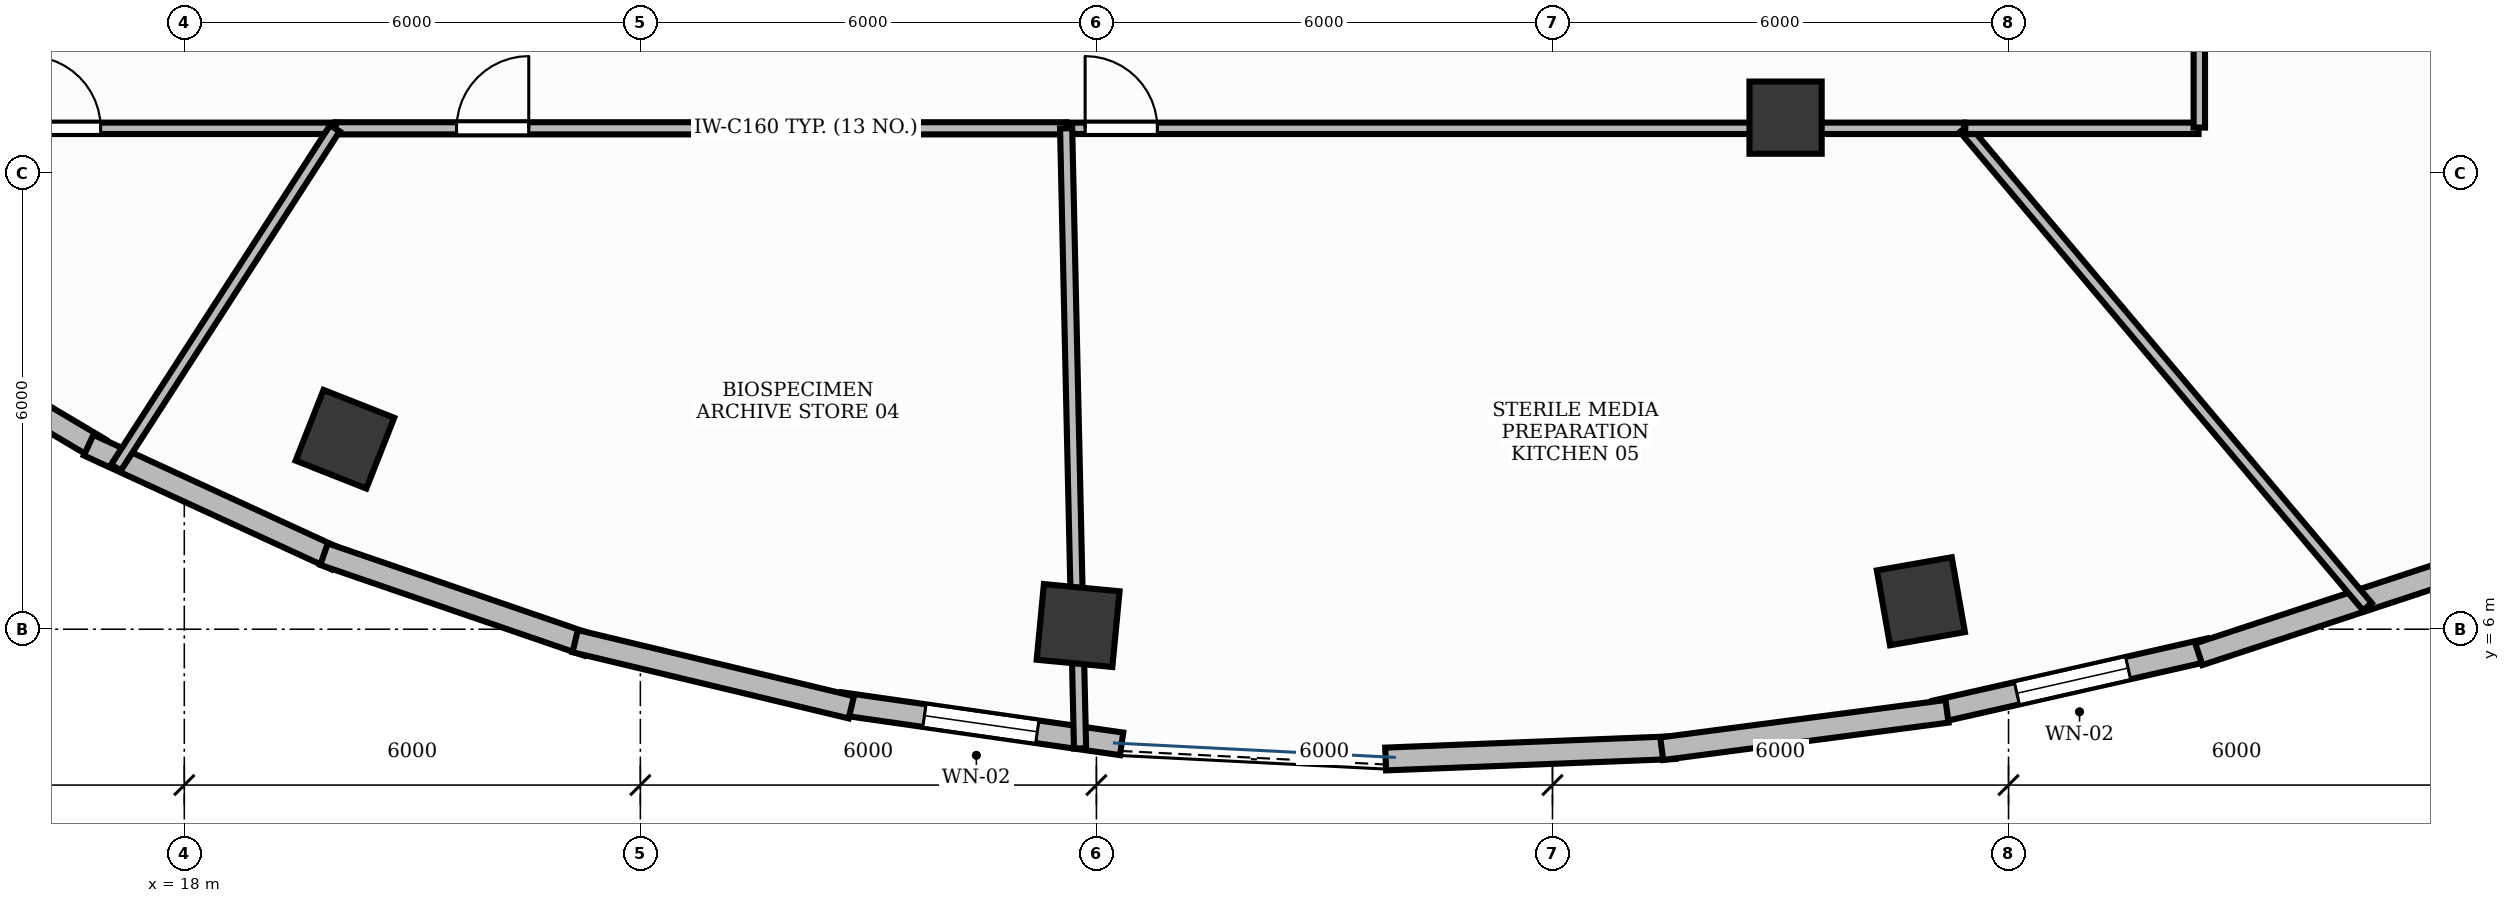
"""IFC4 building model, lengths in metres.
Left out: names, types, materials, properties, quantities, classifications, styles, units other than length and angle.
Written with IfcOpenShell. Run it as: python <this file> out.ifc"""

import sys

from ifc_helpers import new_model, si_unit, direction, frame, frame_2d, origin, origin_2d, place, context, subcontext, project, spatial, rectangle, extrude, element, fill, save


model = new_model("IFC4")
c1 = context("Model", 3, precision=1e-05, world=origin(), true_north=direction((0.0, 1.0)))
c2 = subcontext(c1, "Body", "Model", "MODEL_VIEW")
j1 = project(units=[si_unit("LENGTHUNIT", "METRE"), si_unit("PLANEANGLEUNIT", "RADIAN")], contexts=[c1])
p1 = place(None, origin())
s1 = spatial("IfcSite", under=j1, at=p1, CompositionType="ELEMENT")
p2 = place(p1, origin())
s2 = spatial("IfcBuilding", under=s1, at=p2, CompositionType="ELEMENT")
p3 = place(p2, frame((0.0, 0.0, 218.4)))
s3 = spatial("IfcBuildingStorey", under=s2, at=p3, CompositionType="ELEMENT", Elevation=218.4)
for number, where, z_axis, x_axis in (
    (1, (20.113, 8.5, -0.0), (0.0, 0.0, 1.0), (-0.93, 0.367, 0.0)),
    (2, (29.759, 6.049, -0.0), (0.0, 0.0, 1.0), (-0.995, 0.095, 0.0)),
    (3, (40.847, 6.368, -0.0), (0.0, 0.0, 1.0), (0.985, 0.173, 0.0)),
):
    element("IfcColumn", number, at=place(p3, frame(where, z_axis=z_axis, x_axis=x_axis)), inside=s3, PredefinedType="COLUMN", context=c2, shape_type="SweptSolid", body=[
        extrude(rectangle(XDim=1.0, YDim=1.0, at=origin_2d()), origin(), (0.0, 0.0, 1.0), 3.901),
    ])
p4 = place(p3, frame((39.067, 12.73, -0.0), z_axis=(0.0, 0.0, 1.0), x_axis=(1.0, 0.0, 0.0)))
e4 = element("IfcColumn", 4, at=p4, inside=s3, PredefinedType="COLUMN", context=c2, shape_type="SweptSolid", body=[
    extrude(rectangle(XDim=0.95, YDim=0.95, at=origin_2d()), origin(), (0.0, 0.0, 1.0), 3.901),
])
p5 = place(p3, frame((13.923, 10.132, 0.0), z_axis=(0.0, 0.0, 1.0), x_axis=(0.859459434124, -0.511203952543, 0.0)))
e5 = element("IfcWall", 5, at=p5, inside=s3, PredefinedType="STANDARD", context=c2, shape_type="SweptSolid", body=[
    extrude(rectangle(XDim=3.45, YDim=0.3, at=frame_2d((1.725, 0.0))), origin(), (0.0, 0.0, 1.0), 3.9),
])
p6 = place(p5, frame((0.975, 0.0, 0.95)))
e6 = element("IfcOpeningElement", 6, at=p6, cuts=e5, PredefinedType="OPENING", context=c2, shape_type="SweptSolid", body=[
    extrude(rectangle(XDim=1.5, YDim=1.8, at=frame_2d((0.75, 0.9))), frame((0.0, 0.165, 0.0), z_axis=(0.0, -1.0, 0.0), x_axis=(1.0, 0.0, 0.0)), (0.0, 0.0, 1.0), 0.33),
])
p7 = place(p3, frame((26.628, 5.022, 0.0), z_axis=(0.0, 0.0, 1.0), x_axis=(0.989905072127, -0.14173195891, 0.0)))
e7 = element("IfcWall", 7, at=p7, inside=s3, PredefinedType="STANDARD", context=c2, shape_type="SweptSolid", body=[
    extrude(rectangle(XDim=3.741, YDim=0.3, at=frame_2d((1.871, 0.0))), origin(), (0.0, 0.0, 1.0), 3.9),
])
p8 = place(p7, frame((1.121, 0.0, 0.95)))
e8 = element("IfcOpeningElement", 8, at=p8, cuts=e7, PredefinedType="OPENING", context=c2, shape_type="SweptSolid", body=[
    extrude(rectangle(XDim=1.5, YDim=1.8, at=frame_2d((0.75, 0.9))), frame((0.0, 0.165, 0.0), z_axis=(0.0, -1.0, 0.0), x_axis=(1.0, 0.0, 0.0)), (0.0, 0.0, 1.0), 0.33),
])
p9 = place(p3, frame((41.036, 4.914, 0.0), z_axis=(0.0, 0.0, 1.0), x_axis=(0.975237678872, 0.221159376263, 0.0)))
e9 = element("IfcWall", 9, at=p9, inside=s3, PredefinedType="STANDARD", context=c2, shape_type="SweptSolid", body=[
    extrude(rectangle(XDim=3.703, YDim=0.3, at=frame_2d((1.851, 0.0))), origin(), (0.0, 0.0, 1.0), 3.9),
])
p10 = place(p9, frame((1.101, 0.0, 0.95)))
e10 = element("IfcOpeningElement", 10, at=p10, cuts=e9, PredefinedType="OPENING", context=c2, shape_type="SweptSolid", body=[
    extrude(rectangle(XDim=1.5, YDim=1.8, at=frame_2d((0.75, 0.9))), frame((0.0, 0.165, 0.0), z_axis=(0.0, -1.0, 0.0), x_axis=(1.0, 0.0, 0.0)), (0.0, 0.0, 1.0), 0.33),
])
p11 = place(p3, frame((16.741, 8.422, 0.0), z_axis=(0.0, 0.0, 1.0), x_axis=(0.908506474671, -0.417870776055, 0.0)))
e11 = element("IfcWall", 11, at=p11, inside=s3, PredefinedType="STANDARD", context=c2, shape_type="SweptSolid", body=[
    extrude(rectangle(XDim=3.587, YDim=0.3, at=frame_2d((1.793, 0.0))), origin(), (0.0, 0.0, 1.0), 3.47),
])
p12 = place(p3, frame((19.838, 6.988, 0.0), z_axis=(0.0, 0.0, 1.0), x_axis=(0.945722383555, -0.32497565023, 0.0)))
e12 = element("IfcWall", 12, at=p12, inside=s3, PredefinedType="STANDARD", context=c2, shape_type="SweptSolid", body=[
    extrude(rectangle(XDim=3.67, YDim=0.3, at=frame_2d((1.835, 0.0))), origin(), (0.0, 0.0, 1.0), 3.9),
])
p13 = place(p3, frame((23.143, 5.843, 0.0), z_axis=(0.0, 0.0, 1.0), x_axis=(0.972475629939, -0.233004611918, 0.0)))
e13 = element("IfcWall", 13, at=p13, inside=s3, PredefinedType="STANDARD", context=c2, shape_type="SweptSolid", body=[
    extrude(rectangle(XDim=3.735, YDim=0.3, at=frame_2d((1.868, 0.0))), origin(), (0.0, 0.0, 1.0), 3.9),
])
p14 = place(p3, frame((33.805, 4.292, 0.0), z_axis=(0.0, 0.0, 1.0), x_axis=(0.999221923177, 0.039440439173, 0.0)))
e14 = element("IfcWall", 14, at=p14, inside=s3, PredefinedType="STANDARD", context=c2, shape_type="SweptSolid", body=[
    extrude(rectangle(XDim=3.807, YDim=0.3, at=frame_2d((1.903, 0.0))), origin(), (0.0, 0.0, 1.0), 3.9),
])
p15 = place(p3, frame((37.437, 4.428, 0.0), z_axis=(0.0, 0.0, 1.0), x_axis=(0.991512801574, 0.130009093201, 0.0)))
e15 = element("IfcWall", 15, at=p15, inside=s3, PredefinedType="STANDARD", context=c2, shape_type="SweptSolid", body=[
    extrude(rectangle(XDim=3.786, YDim=0.3, at=frame_2d((1.893, 0.0))), origin(), (0.0, 0.0, 1.0), 3.9),
])
p16 = place(p3, frame((44.504, 5.671, 0.0), z_axis=(0.0, 0.0, 1.0), x_axis=(0.94972655205, 0.313080622734, 0.0)))
e16 = element("IfcWall", 16, at=p16, inside=s3, PredefinedType="STANDARD", context=c2, shape_type="SweptSolid", body=[
    extrude(rectangle(XDim=3.679, YDim=0.3, at=frame_2d((1.84, 0.0))), origin(), (0.0, 0.0, 1.0), 3.9),
])
p17 = place(p3, frame((14.454, 12.59, 0.0), z_axis=(0.0, 0.0, 1.0), x_axis=(1.0, 0.0, 0.0)))
e17 = element("IfcWall", 17, at=p17, inside=s3, PredefinedType="PARTITIONING", context=c2, shape_type="SweptSolid", body=[
    extrude(rectangle(XDim=5.527, YDim=0.15, at=frame_2d((2.763, 0.0))), origin(), (0.0, 0.0, 1.0), 2.91),
])
p18 = place(p17, frame((1.496, 0.0, 0.0)))
e18 = element("IfcOpeningElement", 18, at=p18, cuts=e17, PredefinedType="OPENING", context=c2, shape_type="SweptSolid", body=[
    extrude(rectangle(XDim=0.95, YDim=2.15, at=frame_2d((0.475, 1.075))), frame((0.0, 0.09, 0.0), z_axis=(0.0, -1.0, 0.0), x_axis=(1.0, 0.0, 0.0)), (0.0, 0.0, 1.0), 0.18),
])
p19 = place(p3, frame((19.991, 12.59, 0.0), z_axis=(0.0, 0.0, 1.0), x_axis=(1.0, 0.0, 0.0)))
e19 = element("IfcWall", 19, at=p19, inside=s3, PredefinedType="PARTITIONING", context=c2, shape_type="SweptSolid", body=[
    extrude(rectangle(XDim=9.611, YDim=0.16, at=frame_2d((4.805, 0.0))), origin(), (0.0, 0.0, 1.0), 2.91),
])
p20 = place(p19, frame((1.591, 0.0, 0.0)))
e20 = element("IfcOpeningElement", 20, at=p20, cuts=e19, PredefinedType="OPENING", context=c2, shape_type="SweptSolid", body=[
    extrude(rectangle(XDim=0.95, YDim=2.15, at=frame_2d((0.475, 1.075))), frame((0.0, 0.095, 0.0), z_axis=(0.0, -1.0, 0.0), x_axis=(1.0, 0.0, 0.0)), (0.0, 0.0, 1.0), 0.19),
])
p21 = place(p3, frame((29.612, 12.59, 0.0), z_axis=(0.0, 0.0, 1.0), x_axis=(1.0, 0.0, 0.0)))
e21 = element("IfcWall", 21, at=p21, inside=s3, PredefinedType="PARTITIONING", context=c2, shape_type="SweptSolid", body=[
    extrude(rectangle(XDim=11.806, YDim=0.15, at=frame_2d((5.903, 0.0))), origin(), (0.0, 0.0, 1.0), 2.91),
])
p22 = place(p21, frame((0.24, 0.0, 0.0)))
e22 = element("IfcOpeningElement", 22, at=p22, cuts=e21, PredefinedType="OPENING", context=c2, shape_type="SweptSolid", body=[
    extrude(rectangle(XDim=0.95, YDim=2.15, at=frame_2d((0.475, 1.075))), frame((0.0, 0.09, 0.0), z_axis=(0.0, -1.0, 0.0), x_axis=(1.0, 0.0, 0.0)), (0.0, 0.0, 1.0), 0.18),
])
p23 = place(p3, frame((19.981, 12.59, 0.0), z_axis=(0.0, 0.0, 1.0), x_axis=(-0.542120587928, -0.840300701026, 0.0)))
e23 = element("IfcWall", 23, at=p23, inside=s3, PredefinedType="PARTITIONING", context=c2, shape_type="SweptSolid", body=[
    extrude(rectangle(XDim=5.311, YDim=0.15, at=frame_2d((2.656, 0.0))), origin(), (0.0, 0.0, 1.0), 2.91),
])
p24 = place(p3, frame((29.602, 12.59, 0.0), z_axis=(0.0, 0.0, 1.0), x_axis=(0.02244070068, -0.999748175769, 0.0)))
e24 = element("IfcWall", 24, at=p24, inside=s3, PredefinedType="PARTITIONING", context=c2, shape_type="SweptSolid", body=[
    extrude(rectangle(XDim=8.159, YDim=0.16, at=frame_2d((4.08, 0.0))), origin(), (0.0, 0.0, 1.0), 2.91),
])
p25 = place(p3, frame((41.418, 12.59, 0.0), z_axis=(0.0, 0.0, 1.0), x_axis=(0.644315695233, -0.764759625554, 0.0)))
e25 = element("IfcWall", 25, at=p25, inside=s3, PredefinedType="PARTITIONING", context=c2, shape_type="SweptSolid", body=[
    extrude(rectangle(XDim=8.23, YDim=0.15, at=frame_2d((4.115, 0.0))), origin(), (0.0, 0.0, 1.0), 2.91),
])
p26 = place(p3, frame((41.431, 12.59, 0.0), z_axis=(0.0, 0.0, 1.0), x_axis=(1.0, 0.0, 0.0)))
e26 = element("IfcWall", 26, at=p26, inside=s3, PredefinedType="PARTITIONING", context=c2, shape_type="SweptSolid", body=[
    extrude(rectangle(XDim=3.069, YDim=0.15, at=frame_2d((1.535, 0.0))), origin(), (0.0, 0.0, 1.0), 2.91),
])
p27 = place(p3, frame((44.51, 12.6, 0.0), z_axis=(0.0, 0.0, 1.0), x_axis=(0.0, 1.0, 0.0)))
e27 = element("IfcWall", 27, at=p27, inside=s3, PredefinedType="PARTITIONING", context=c2, shape_type="SweptSolid", body=[
    extrude(rectangle(XDim=3.8, YDim=0.15, at=frame_2d((1.9, 0.0))), origin(), (0.0, 0.0, 1.0), 2.91),
])
p28 = place(p8, origin())
e28 = element("IfcWindow", 28, at=p28, inside=s3, PartitioningType="DOUBLE_PANEL_VERTICAL", PredefinedType="WINDOW", context=c2, shape_type="SweptSolid", body=[
    extrude(rectangle(XDim=1.5, YDim=1.8, at=frame_2d((0.75, 0.9))), frame((0.0, 0.03, 0.0), z_axis=(0.0, -1.0, 0.0), x_axis=(1.0, 0.0, 0.0)), (0.0, 0.0, 1.0), 0.06),
])
fill(e8, e28)
p29 = place(p10, origin())
e29 = element("IfcWindow", 29, at=p29, inside=s3, PartitioningType="DOUBLE_PANEL_VERTICAL", PredefinedType="WINDOW", context=c2, shape_type="SweptSolid", body=[
    extrude(rectangle(XDim=1.5, YDim=1.8, at=frame_2d((0.75, 0.9))), frame((0.0, 0.03, 0.0), z_axis=(0.0, -1.0, 0.0), x_axis=(1.0, 0.0, 0.0)), (0.0, 0.0, 1.0), 0.06),
])
fill(e10, e29)
p30 = place(p18, origin())
e30 = element("IfcDoor", 30, at=p30, inside=s3, OperationType="SINGLE_SWING_LEFT", PredefinedType="DOOR", context=c2, shape_type="SweptSolid", body=[
    extrude(rectangle(XDim=0.95, YDim=2.15, at=frame_2d((0.475, 1.075))), frame((0.0, 0.025, 0.0), z_axis=(0.0, -1.0, 0.0), x_axis=(1.0, 0.0, 0.0)), (0.0, 0.0, 1.0), 0.05),
])
fill(e18, e30)
p31 = place(p20, origin())
e31 = element("IfcDoor", 31, at=p31, inside=s3, OperationType="SINGLE_SWING_RIGHT", PredefinedType="DOOR", context=c2, shape_type="SweptSolid", body=[
    extrude(rectangle(XDim=0.95, YDim=2.15, at=frame_2d((0.475, 1.075))), frame((0.0, 0.025, 0.0), z_axis=(0.0, -1.0, 0.0), x_axis=(1.0, 0.0, 0.0)), (0.0, 0.0, 1.0), 0.05),
])
fill(e20, e31)
p32 = place(p22, origin())
e32 = element("IfcDoor", 32, at=p32, inside=s3, OperationType="SINGLE_SWING_LEFT", PredefinedType="DOOR", context=c2, shape_type="SweptSolid", body=[
    extrude(rectangle(XDim=0.95, YDim=2.15, at=frame_2d((0.475, 1.075))), frame((0.0, 0.025, 0.0), z_axis=(0.0, -1.0, 0.0), x_axis=(1.0, 0.0, 0.0)), (0.0, 0.0, 1.0), 0.05),
])
fill(e22, e32)
save(model, sys.argv[1])
